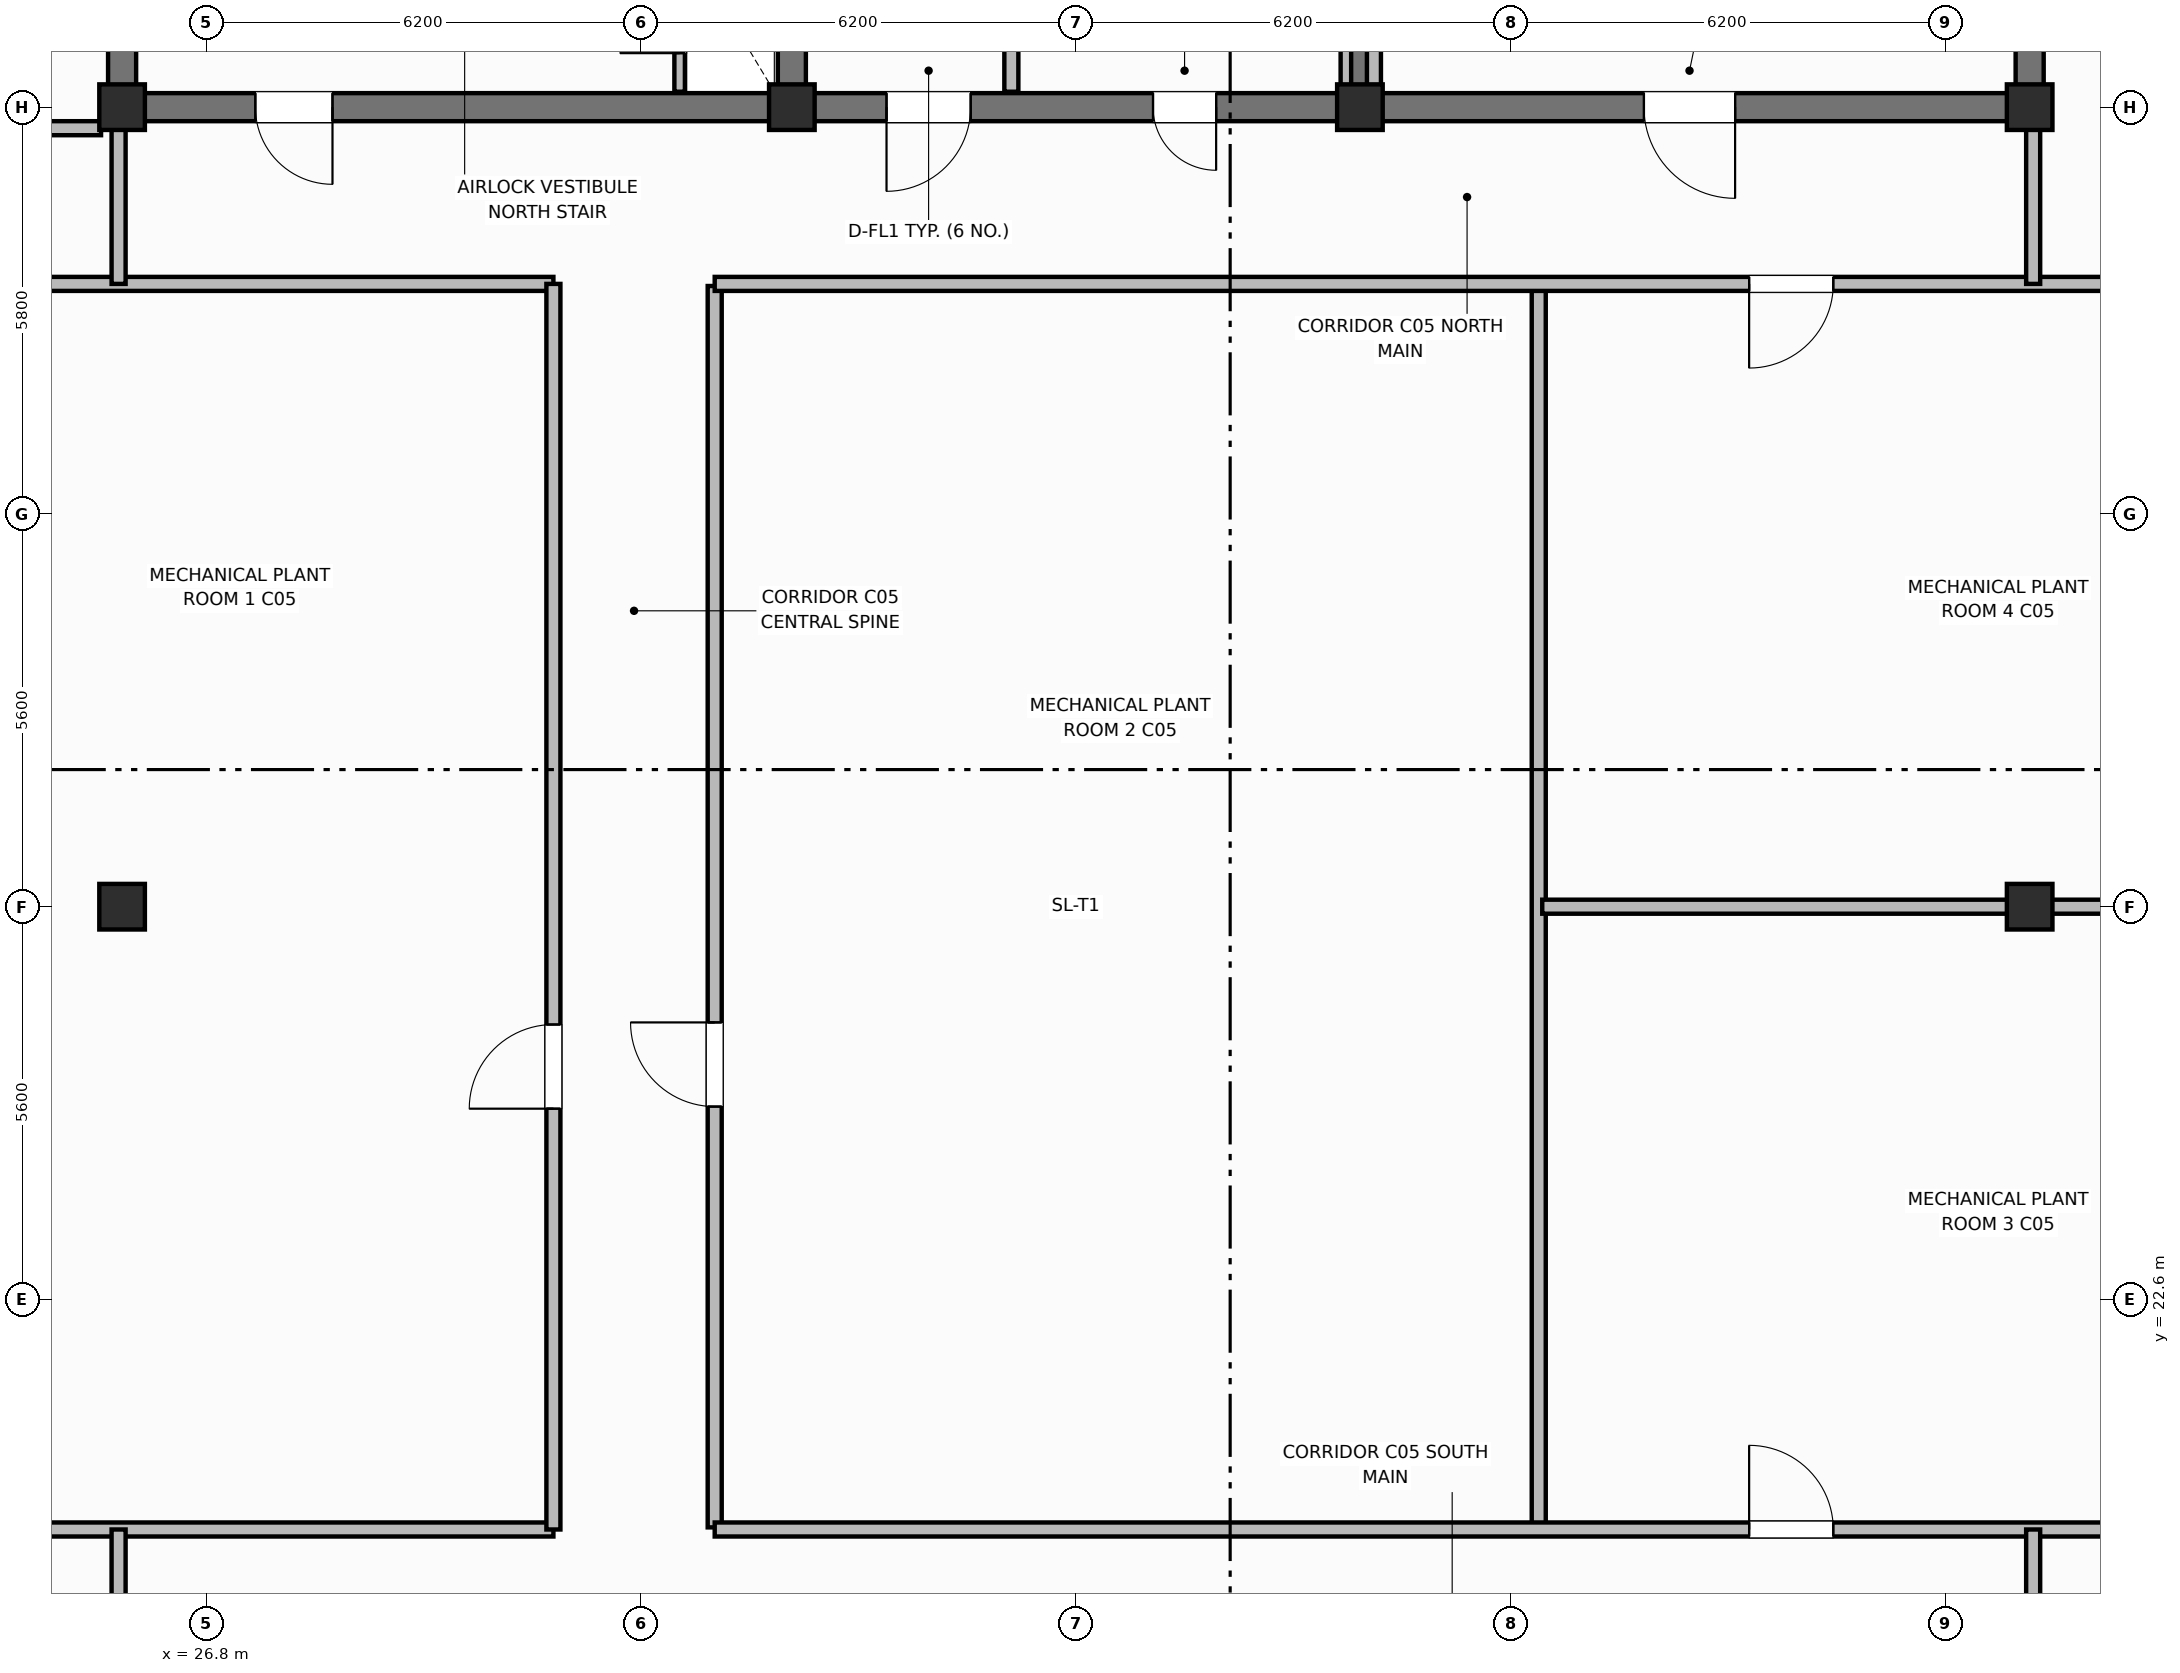
"""IFC4 building model, lengths in metres.
Left out: names, types, materials, properties, quantities, classifications, styles, units other than length and angle.
Written with IfcOpenShell. Run it as: python <this file> out.ifc"""

import sys

from ifc_helpers import new_model, si_unit, direction, frame, frame_2d, origin, origin_2d, place, context, subcontext, project, spatial, rectangle, extrude, element, fill, save


model = new_model("IFC4")
c1 = context("Model", 3, precision=1e-05, world=origin(), true_north=direction((0.0, 1.0)))
c2 = subcontext(c1, "Body", "Model", "MODEL_VIEW")
j1 = project(units=[si_unit("LENGTHUNIT", "METRE"), si_unit("PLANEANGLEUNIT", "RADIAN")], contexts=[c1])
p1 = place(None, origin())
s1 = spatial("IfcSite", under=j1, at=p1, CompositionType="ELEMENT")
p2 = place(p1, origin())
s2 = spatial("IfcBuilding", under=s1, at=p2, CompositionType="ELEMENT")
p3 = place(p2, frame((0.0, 0.0, 316.4)))
s3 = spatial("IfcBuildingStorey", under=s2, at=p3, CompositionType="ELEMENT", Elevation=316.4)
for number, where, z_axis, x_axis in (
    (1, (25.6, 39.8, 0.0), (0.0, 0.0, 1.0), (0.0, 1.0, 0.0)),
    (2, (52.8, 39.8, 0.0), (0.0, 0.0, 1.0), (0.0, 1.0, 0.0)),
):
    element("IfcWall", number, at=place(p3, frame(where, z_axis=z_axis, x_axis=x_axis)), inside=s3, PredefinedType="SHEAR", context=c2, shape_type="SweptSolid", body=[
        extrude(rectangle(XDim=5.8, YDim=0.4, at=frame_2d((2.9, 0.0))), origin(), (0.0, 0.0, 1.0), 3.6),
    ])
p4 = place(p3, frame((52.8, 39.6, 0.0), z_axis=(0.0, 0.0, 1.0), x_axis=(-1.0, 0.0, 0.0)))
e3 = element("IfcWall", 3, at=p4, inside=s3, PredefinedType="SHEAR", context=c2, shape_type="SweptSolid", body=[
    extrude(rectangle(XDim=27.2, YDim=0.4, at=frame_2d((13.6, 0.0))), origin(), (0.0, 0.0, 1.0), 3.6),
])
p5 = place(p4, frame((24.2, 0.0, 0.0)))
e4 = element("IfcOpeningElement", 4, at=p5, cuts=e3, PredefinedType="OPENING", context=c2, shape_type="SweptSolid", body=[
    extrude(rectangle(XDim=1.1, YDim=2.15, at=frame_2d((0.55, 1.075))), frame((0.0, 0.21, 0.0), z_axis=(0.0, -1.0, 0.0), x_axis=(1.0, 0.0, 0.0)), (0.0, 0.0, 1.0), 0.42),
])
p6 = place(p4, frame((15.1, 0.0, 0.0)))
e5 = element("IfcOpeningElement", 5, at=p6, cuts=e3, PredefinedType="OPENING", context=c2, shape_type="SweptSolid", body=[
    extrude(rectangle(XDim=1.2, YDim=2.15, at=frame_2d((0.6, 1.075))), frame((0.0, 0.21, 0.0), z_axis=(0.0, -1.0, 0.0), x_axis=(1.0, 0.0, 0.0)), (0.0, 0.0, 1.0), 0.42),
])
p7 = place(p4, frame((11.6, 0.0, 0.0)))
e6 = element("IfcOpeningElement", 6, at=p7, cuts=e3, PredefinedType="OPENING", context=c2, shape_type="SweptSolid", body=[
    extrude(rectangle(XDim=0.9, YDim=2.1, at=frame_2d((0.45, 1.05))), frame((0.0, 0.21, 0.0), z_axis=(0.0, -1.0, 0.0), x_axis=(1.0, 0.0, 0.0)), (0.0, 0.0, 1.0), 0.42),
])
p8 = place(p4, frame((4.2, 0.0, 0.0)))
e7 = element("IfcOpeningElement", 7, at=p8, cuts=e3, PredefinedType="OPENING", context=c2, shape_type="SweptSolid", body=[
    extrude(rectangle(XDim=1.3, YDim=2.2, at=frame_2d((0.65, 1.1))), frame((0.0, 0.21, 0.0), z_axis=(0.0, -1.0, 0.0), x_axis=(1.0, 0.0, 0.0)), (0.0, 0.0, 1.0), 0.42),
])
for number, where, z_axis, x_axis in (
    (8, (35.15, 39.8, 0.0), (0.0, 0.0, 1.0), (0.0, 1.0, 0.0)),
    (9, (43.25, 39.8, 0.0), (0.0, 0.0, 1.0), (0.0, 1.0, 0.0)),
):
    element("IfcWall", number, at=place(p3, frame(where, z_axis=z_axis, x_axis=x_axis)), inside=s3, PredefinedType="SHEAR", context=c2, shape_type="SweptSolid", body=[
        extrude(rectangle(XDim=5.8, YDim=0.4, at=frame_2d((2.9, 0.0))), origin(), (0.0, 0.0, 1.0), 3.6),
    ])
for number, where, z_axis, x_axis in (
    (10, (25.6, 39.6, 0.0), (0.0, 0.0, 1.0), (1.0, 0.0, 0.0)),
    (11, (35.15, 39.6, 0.0), (0.0, 0.0, 1.0), (1.0, 0.0, 0.0)),
    (12, (43.25, 39.6, 0.0), (0.0, 0.0, 1.0), (1.0, 0.0, 0.0)),
    (13, (52.8, 39.6, 0.0), (0.0, 0.0, 1.0), (1.0, 0.0, 0.0)),
    (14, (25.6, 28.2, 0.0), (0.0, 0.0, 1.0), (1.0, 0.0, 0.0)),
    (15, (52.8, 28.2, 0.0), (0.0, 0.0, 1.0), (1.0, 0.0, 0.0)),
):
    element("IfcColumn", number, at=place(p3, frame(where, z_axis=z_axis, x_axis=x_axis)), inside=s3, PredefinedType="COLUMN", context=c2, shape_type="SweptSolid", body=[
        extrude(rectangle(XDim=0.65, YDim=0.65, at=origin_2d()), origin(), (0.0, 0.0, 1.0), 3.6),
    ])
p9 = place(p3, frame((33.55, 39.82, 0.0), z_axis=(0.0, 0.0, 1.0), x_axis=(0.0, 1.0, 0.0)))
e16 = element("IfcWall", 16, at=p9, inside=s3, PredefinedType="PARTITIONING", context=c2, shape_type="SweptSolid", body=[
    extrude(rectangle(XDim=2.13, YDim=0.15, at=frame_2d((1.065, 0.0))), origin(), (0.0, 0.0, 1.0), 2.54),
])
p10 = place(p9, frame((0.55, 0.0, 0.0)))
e17 = element("IfcOpeningElement", 17, at=p10, cuts=e16, PredefinedType="OPENING", context=c2, shape_type="SweptSolid", body=[
    extrude(rectangle(XDim=0.85, YDim=2.05, at=frame_2d((0.425, 1.025))), frame((0.0, 0.085, 0.0), z_axis=(0.0, -1.0, 0.0), x_axis=(1.0, 0.0, 0.0)), (0.0, 0.0, 1.0), 0.17),
])
p11 = place(p3, frame((38.28, 39.82, 0.0), z_axis=(0.0, 0.0, 1.0), x_axis=(0.0, 1.0, 0.0)))
e18 = element("IfcWall", 18, at=p11, inside=s3, PredefinedType="PARTITIONING", context=c2, shape_type="SweptSolid", body=[
    extrude(rectangle(XDim=5.63, YDim=0.2, at=frame_2d((2.815, 0.0))), origin(), (0.0, 0.0, 1.0), 2.54),
])
p12 = place(p3, frame((43.05, 39.82, 0.0), z_axis=(0.0, 0.0, 1.0), x_axis=(0.0, 1.0, 0.0)))
e19 = element("IfcWall", 19, at=p12, inside=s3, PredefinedType="PARTITIONING", context=c2, shape_type="SweptSolid", body=[
    extrude(rectangle(XDim=5.63, YDim=0.15, at=frame_2d((2.815, 0.0))), origin(), (0.0, 0.0, 1.0), 2.54),
])
p13 = place(p3, frame((43.45, 39.82, 0.0), z_axis=(0.0, 0.0, 1.0), x_axis=(0.0, 1.0, 0.0)))
e20 = element("IfcWall", 20, at=p13, inside=s3, PredefinedType="PARTITIONING", context=c2, shape_type="SweptSolid", body=[
    extrude(rectangle(XDim=5.63, YDim=0.2, at=frame_2d((2.815, 0.0))), origin(), (0.0, 0.0, 1.0), 2.54),
])
for number, where, z_axis, x_axis in (
    (21, (21.53, 19.32, 0.0), (0.0, 0.0, 1.0), (1.0, 0.0, 0.0)),
    (22, (21.53, 37.08, 0.0), (0.0, 0.0, 1.0), (1.0, 0.0, 0.0)),
):
    element("IfcWall", number, at=place(p3, frame(where, z_axis=z_axis, x_axis=x_axis)), inside=s3, PredefinedType="PARTITIONING", context=c2, shape_type="SweptSolid", body=[
        extrude(rectangle(XDim=10.22, YDim=0.2, at=frame_2d((5.11, 0.0))), origin(), (0.0, 0.0, 1.0), 2.54),
    ])
p14 = place(p3, frame((31.75, 19.32, 0.0), z_axis=(0.0, 0.0, 1.0), x_axis=(0.0, 1.0, 0.0)))
e23 = element("IfcWall", 23, at=p14, inside=s3, PredefinedType="PARTITIONING", context=c2, shape_type="SweptSolid", body=[
    extrude(rectangle(XDim=17.76, YDim=0.2, at=frame_2d((8.88, 0.0))), origin(), (0.0, 0.0, 1.0), 2.54),
])
p15 = place(p14, frame((6.0, 0.0, 0.0)))
e24 = element("IfcOpeningElement", 24, at=p15, cuts=e23, PredefinedType="OPENING", context=c2, shape_type="SweptSolid", body=[
    extrude(rectangle(XDim=1.2, YDim=2.15, at=frame_2d((0.6, 1.075))), frame((0.0, 0.11, 0.0), z_axis=(0.0, -1.0, 0.0), x_axis=(1.0, 0.0, 0.0)), (0.0, 0.0, 1.0), 0.22),
])
p16 = place(p3, frame((34.05, 19.35, 0.0), z_axis=(0.0, 0.0, 1.0), x_axis=(0.0, 1.0, 0.0)))
e25 = element("IfcWall", 25, at=p16, inside=s3, PredefinedType="PARTITIONING", context=c2, shape_type="SweptSolid", body=[
    extrude(rectangle(XDim=17.7, YDim=0.2, at=frame_2d((8.85, 0.0))), origin(), (0.0, 0.0, 1.0), 2.54),
])
p17 = place(p16, frame((6.0, 0.0, 0.0)))
e26 = element("IfcOpeningElement", 26, at=p17, cuts=e25, PredefinedType="OPENING", context=c2, shape_type="SweptSolid", body=[
    extrude(rectangle(XDim=1.2, YDim=2.15, at=frame_2d((0.6, 1.075))), frame((0.0, 0.11, 0.0), z_axis=(0.0, -1.0, 0.0), x_axis=(1.0, 0.0, 0.0)), (0.0, 0.0, 1.0), 0.22),
])
p18 = place(p3, frame((45.8, 19.35, 0.0), z_axis=(0.0, 0.0, 1.0), x_axis=(0.0, 1.0, 0.0)))
e27 = element("IfcWall", 27, at=p18, inside=s3, PredefinedType="PARTITIONING", context=c2, shape_type="SweptSolid", body=[
    extrude(rectangle(XDim=17.7, YDim=0.2, at=frame_2d((8.85, 0.0))), origin(), (0.0, 0.0, 1.0), 2.54),
])
p19 = place(p3, frame((45.85, 28.2, 0.0), z_axis=(0.0, 0.0, 1.0), x_axis=(1.0, 0.0, 0.0)))
e28 = element("IfcWall", 28, at=p19, inside=s3, PredefinedType="PARTITIONING", context=c2, shape_type="SweptSolid", body=[
    extrude(rectangle(XDim=11.02, YDim=0.2, at=frame_2d((5.51, 0.0))), origin(), (0.0, 0.0, 1.0), 2.54),
])
p20 = place(p3, frame((34.05, 19.32, 0.0), z_axis=(0.0, 0.0, 1.0), x_axis=(1.0, 0.0, 0.0)))
e29 = element("IfcWall", 29, at=p20, inside=s3, PredefinedType="PARTITIONING", context=c2, shape_type="SweptSolid", body=[
    extrude(rectangle(XDim=22.82, YDim=0.2, at=frame_2d((11.41, 0.0))), origin(), (0.0, 0.0, 1.0), 2.54),
])
p21 = place(p20, frame((14.75, 0.0, 0.0)))
e30 = element("IfcOpeningElement", 30, at=p21, cuts=e29, PredefinedType="OPENING", context=c2, shape_type="SweptSolid", body=[
    extrude(rectangle(XDim=1.2, YDim=2.15, at=frame_2d((0.6, 1.075))), frame((0.0, 0.11, 0.0), z_axis=(0.0, -1.0, 0.0), x_axis=(1.0, 0.0, 0.0)), (0.0, 0.0, 1.0), 0.22),
])
p22 = place(p3, frame((56.87, 37.08, 0.0), z_axis=(0.0, 0.0, 1.0), x_axis=(-1.0, 0.0, 0.0)))
e31 = element("IfcWall", 31, at=p22, inside=s3, PredefinedType="PARTITIONING", context=c2, shape_type="SweptSolid", body=[
    extrude(rectangle(XDim=22.82, YDim=0.2, at=frame_2d((11.41, 0.0))), origin(), (0.0, 0.0, 1.0), 2.54),
])
p23 = place(p22, frame((6.87, 0.0, 0.0)))
e32 = element("IfcOpeningElement", 32, at=p23, cuts=e31, PredefinedType="OPENING", context=c2, shape_type="SweptSolid", body=[
    extrude(rectangle(XDim=1.2, YDim=2.15, at=frame_2d((0.6, 1.075))), frame((0.0, 0.11, 0.0), z_axis=(0.0, -1.0, 0.0), x_axis=(1.0, 0.0, 0.0)), (0.0, 0.0, 1.0), 0.22),
])
p24 = place(p3, frame((52.85, 16.95, 0.0), z_axis=(0.0, 0.0, 1.0), x_axis=(0.0, 1.0, 0.0)))
e33 = element("IfcWall", 33, at=p24, inside=s3, PredefinedType="PARTITIONING", context=c2, shape_type="SweptSolid", body=[
    extrude(rectangle(XDim=2.37, YDim=0.2, at=frame_2d((1.185, 0.0))), origin(), (0.0, 0.0, 1.0), 2.54),
])
p25 = place(p3, frame((52.85, 37.08, 0.0), z_axis=(0.0, 0.0, 1.0), x_axis=(0.0, 1.0, 0.0)))
e34 = element("IfcWall", 34, at=p25, inside=s3, PredefinedType="PARTITIONING", context=c2, shape_type="SweptSolid", body=[
    extrude(rectangle(XDim=2.37, YDim=0.2, at=frame_2d((1.185, 0.0))), origin(), (0.0, 0.0, 1.0), 2.54),
])
p26 = place(p3, frame((25.55, 16.95, 0.0), z_axis=(0.0, 0.0, 1.0), x_axis=(0.0, 1.0, 0.0)))
e35 = element("IfcWall", 35, at=p26, inside=s3, PredefinedType="PARTITIONING", context=c2, shape_type="SweptSolid", body=[
    extrude(rectangle(XDim=2.37, YDim=0.2, at=frame_2d((1.185, 0.0))), origin(), (0.0, 0.0, 1.0), 2.54),
])
p27 = place(p3, frame((25.55, 37.08, 0.0), z_axis=(0.0, 0.0, 1.0), x_axis=(0.0, 1.0, 0.0)))
e36 = element("IfcWall", 36, at=p27, inside=s3, PredefinedType="PARTITIONING", context=c2, shape_type="SweptSolid", body=[
    extrude(rectangle(XDim=2.37, YDim=0.2, at=frame_2d((1.185, 0.0))), origin(), (0.0, 0.0, 1.0), 2.54),
])
p28 = place(p3, frame((21.53, 39.3, 0.0), z_axis=(0.0, 0.0, 1.0), x_axis=(1.0, 0.0, 0.0)))
e37 = element("IfcWall", 37, at=p28, inside=s3, PredefinedType="PARTITIONING", context=c2, shape_type="SweptSolid", body=[
    extrude(rectangle(XDim=3.77, YDim=0.2, at=frame_2d((1.885, 0.0))), origin(), (0.0, 0.0, 1.0), 2.54),
])
p29 = place(p10, origin())
e38 = element("IfcDoor", 38, at=p29, inside=s3, OperationType="SINGLE_SWING_LEFT", PredefinedType="TRAPDOOR", context=c2, shape_type="SweptSolid", body=[
    extrude(rectangle(XDim=0.85, YDim=2.05, at=frame_2d((0.425, 1.025))), frame((0.0, 0.025, 0.0), z_axis=(0.0, -1.0, 0.0), x_axis=(1.0, 0.0, 0.0)), (0.0, 0.0, 1.0), 0.05),
])
fill(e17, e38)
p30 = place(p15, origin())
e39 = element("IfcDoor", 39, at=p30, inside=s3, OperationType="SINGLE_SWING_LEFT", PredefinedType="DOOR", context=c2, shape_type="SweptSolid", body=[
    extrude(rectangle(XDim=1.2, YDim=2.15, at=frame_2d((0.6, 1.075))), frame((0.0, 0.025, 0.0), z_axis=(0.0, -1.0, 0.0), x_axis=(1.0, 0.0, 0.0)), (0.0, 0.0, 1.0), 0.05),
])
fill(e24, e39)
p31 = place(p17, origin())
e40 = element("IfcDoor", 40, at=p31, inside=s3, OperationType="SINGLE_SWING_RIGHT", PredefinedType="DOOR", context=c2, shape_type="SweptSolid", body=[
    extrude(rectangle(XDim=1.2, YDim=2.15, at=frame_2d((0.6, 1.075))), frame((0.0, 0.025, 0.0), z_axis=(0.0, -1.0, 0.0), x_axis=(1.0, 0.0, 0.0)), (0.0, 0.0, 1.0), 0.05),
])
fill(e26, e40)
p32 = place(p21, origin())
e41 = element("IfcDoor", 41, at=p32, inside=s3, OperationType="SINGLE_SWING_LEFT", PredefinedType="DOOR", context=c2, shape_type="SweptSolid", body=[
    extrude(rectangle(XDim=1.2, YDim=2.15, at=frame_2d((0.6, 1.075))), frame((0.0, 0.025, 0.0), z_axis=(0.0, -1.0, 0.0), x_axis=(1.0, 0.0, 0.0)), (0.0, 0.0, 1.0), 0.05),
])
fill(e30, e41)
p33 = place(p23, origin())
e42 = element("IfcDoor", 42, at=p33, inside=s3, OperationType="SINGLE_SWING_RIGHT", PredefinedType="DOOR", context=c2, shape_type="SweptSolid", body=[
    extrude(rectangle(XDim=1.2, YDim=2.15, at=frame_2d((0.6, 1.075))), frame((0.0, 0.025, 0.0), z_axis=(0.0, -1.0, 0.0), x_axis=(1.0, 0.0, 0.0)), (0.0, 0.0, 1.0), 0.05),
])
fill(e32, e42)
p34 = place(p5, origin())
e43 = element("IfcDoor", 43, at=p34, inside=s3, OperationType="SINGLE_SWING_LEFT", PredefinedType="DOOR", context=c2, shape_type="SweptSolid", body=[
    extrude(rectangle(XDim=1.1, YDim=2.15, at=frame_2d((0.55, 1.075))), frame((0.0, 0.025, 0.0), z_axis=(0.0, -1.0, 0.0), x_axis=(1.0, 0.0, 0.0)), (0.0, 0.0, 1.0), 0.05),
])
fill(e4, e43)
p35 = place(p6, origin())
e44 = element("IfcDoor", 44, at=p35, inside=s3, OperationType="SINGLE_SWING_RIGHT", PredefinedType="DOOR", context=c2, shape_type="SweptSolid", body=[
    extrude(rectangle(XDim=1.2, YDim=2.15, at=frame_2d((0.6, 1.075))), frame((0.0, 0.025, 0.0), z_axis=(0.0, -1.0, 0.0), x_axis=(1.0, 0.0, 0.0)), (0.0, 0.0, 1.0), 0.05),
])
fill(e5, e44)
p36 = place(p7, origin())
e45 = element("IfcDoor", 45, at=p36, inside=s3, OperationType="SINGLE_SWING_LEFT", PredefinedType="DOOR", context=c2, shape_type="SweptSolid", body=[
    extrude(rectangle(XDim=0.9, YDim=2.1, at=frame_2d((0.45, 1.05))), frame((0.0, 0.025, 0.0), z_axis=(0.0, -1.0, 0.0), x_axis=(1.0, 0.0, 0.0)), (0.0, 0.0, 1.0), 0.05),
])
fill(e6, e45)
p37 = place(p8, origin())
e46 = element("IfcDoor", 46, at=p37, inside=s3, OperationType="SINGLE_SWING_LEFT", PredefinedType="DOOR", context=c2, shape_type="SweptSolid", body=[
    extrude(rectangle(XDim=1.3, YDim=2.2, at=frame_2d((0.65, 1.1))), frame((0.0, 0.025, 0.0), z_axis=(0.0, -1.0, 0.0), x_axis=(1.0, 0.0, 0.0)), (0.0, 0.0, 1.0), 0.05),
])
fill(e7, e46)
save(model, sys.argv[1])
